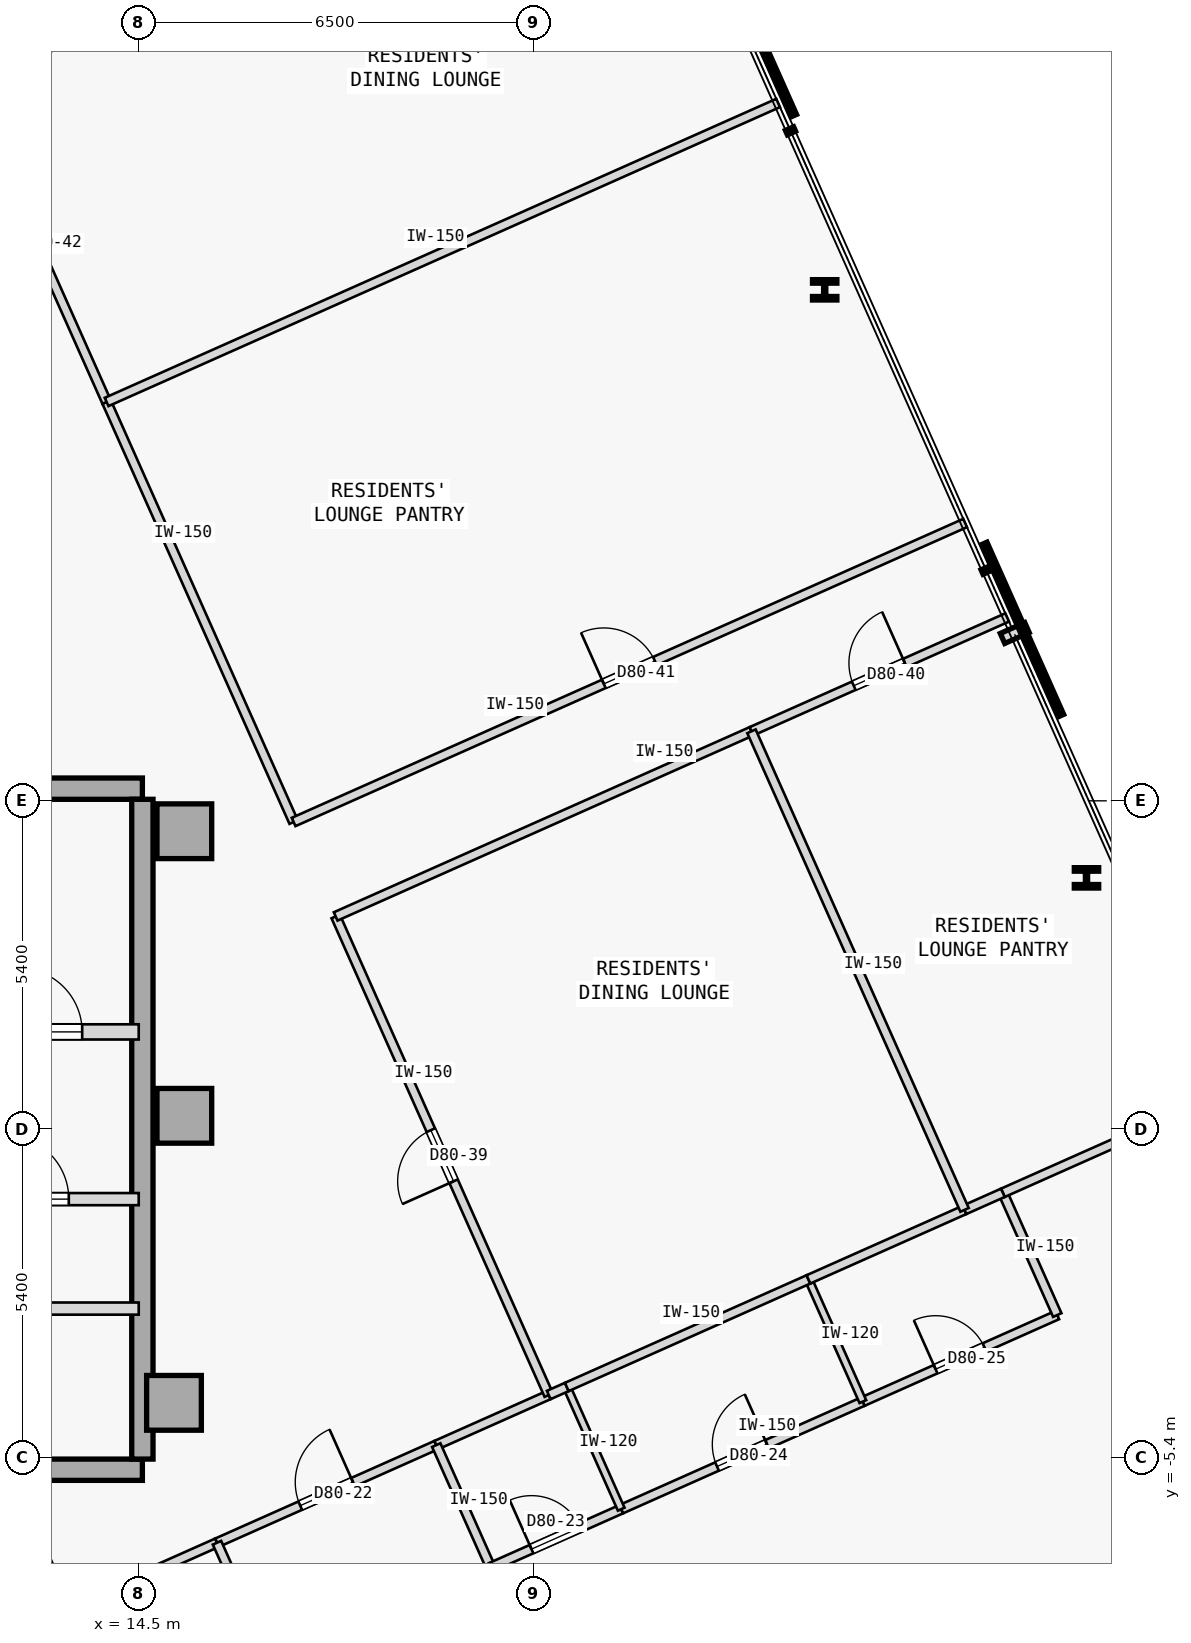
"""IFC4 building model, lengths in metres.
Left out: names, types, materials, properties, quantities, classifications, styles, units other than length and angle.
Written with IfcOpenShell. Run it as: python <this file> out.ifc"""

import sys

from ifc_helpers import new_model, si_unit, direction, frame, frame_2d, origin, origin_2d, place, context, subcontext, project, spatial, rectangle, i_section, extrude, element, fill, save


model = new_model("IFC4")
c1 = context("Model", 3, precision=1e-05, world=origin(), true_north=direction((0.0, 1.0)))
c2 = subcontext(c1, "Body", "Model", "MODEL_VIEW")
j1 = project(units=[si_unit("LENGTHUNIT", "METRE"), si_unit("PLANEANGLEUNIT", "RADIAN")], contexts=[c1])
p1 = place(None, origin())
s1 = spatial("IfcSite", under=j1, at=p1, CompositionType="ELEMENT")
p2 = place(p1, origin())
s2 = spatial("IfcBuilding", under=s1, at=p2, CompositionType="ELEMENT")
p3 = place(p2, frame((0.0, 0.0, 298.65)))
s3 = spatial("IfcBuildingStorey", under=s2, at=p3, CompositionType="ELEMENT", Elevation=298.65)
for number, where, z_axis, x_axis in (
    (1, (15.25, 4.9, 0.0), (0.0, 0.0, 1.0), (1.0, 0.0, 0.0)),
    (2, (15.25, 0.22, 0.0), (0.0, 0.0, 1.0), (1.0, 0.0, 0.0)),
    (3, (15.08, -4.5, 0.0), (0.0, 0.0, 1.0), (1.0, 0.0, 0.0)),
):
    element("IfcColumn", number, at=place(p3, frame(where, z_axis=z_axis, x_axis=x_axis)), inside=s3, PredefinedType="COLUMN", context=c2, shape_type="SweptSolid", body=[
        extrude(rectangle(XDim=0.9, YDim=0.9, at=origin_2d()), origin(), (0.0, 0.0, 1.0), 3.35),
    ])
p4 = place(p3, frame((3.15, 5.6, 0.0), z_axis=(0.0, 0.0, 1.0), x_axis=(1.0, 0.0, 0.0)))
e4 = element("IfcWall", 4, at=p4, inside=s3, PredefinedType="SHEAR", context=c2, shape_type="SweptSolid", body=[
    extrude(rectangle(XDim=11.41, YDim=0.35, at=frame_2d((5.705, 0.0))), origin(), (0.0, 0.0, 1.0), 3.125),
])
p5 = place(p3, frame((3.7, -5.6, 0.0), z_axis=(0.0, 0.0, 1.0), x_axis=(1.0, 0.0, 0.0)))
e5 = element("IfcWall", 5, at=p5, inside=s3, PredefinedType="SHEAR", context=c2, shape_type="SweptSolid", body=[
    extrude(rectangle(XDim=10.86, YDim=0.35, at=frame_2d((5.43, 0.0))), origin(), (0.0, 0.0, 1.0), 3.125),
])
p6 = place(p3, frame((14.56, -5.425, 0.0), z_axis=(0.0, 0.0, 1.0), x_axis=(0.0, 1.0, 0.0)))
e6 = element("IfcWall", 6, at=p6, inside=s3, PredefinedType="SHEAR", context=c2, shape_type="SweptSolid", body=[
    extrude(rectangle(XDim=10.85, YDim=0.35, at=frame_2d((5.425, 0.0))), origin(), (0.0, 0.0, 1.0), 3.125),
])
for number, where, z_axis, x_axis in (
    (7, (30.086, 4.133, 0.0), (0.0, 0.0, 1.0), (1.0, 0.0, 0.0)),
    (8, (25.781, 13.803, 0.0), (0.0, 0.0, 1.0), (1.0, 0.0, 0.0)),
):
    element("IfcColumn", number, at=place(p3, frame(where, z_axis=z_axis, x_axis=x_axis)), inside=s3, PredefinedType="COLUMN", context=c2, shape_type="SweptSolid", body=[
        extrude(i_section(OverallWidth=0.401, OverallDepth=0.335, WebThickness=0.036, FlangeThickness=0.058, FilletRadius=0.015, at=origin_2d()), origin(), (0.0, 0.0, 1.0), 3.35),
    ])
p7 = place(p3, frame((10.9, 1.6, 0.0), z_axis=(0.0, 0.0, 1.0), x_axis=(1.0, 0.0, 0.0)))
e9 = element("IfcWall", 9, at=p7, inside=s3, PredefinedType="STANDARD", context=c2, shape_type="SweptSolid", body=[
    extrude(rectangle(XDim=3.6, YDim=0.25, at=frame_2d((1.8, 0.0))), origin(), (0.0, 0.0, 1.0), 3.125),
])
p8 = place(p7, frame((1.62, 0.0, 0.0)))
e10 = element("IfcOpeningElement", 10, at=p8, cuts=e9, PredefinedType="OPENING", context=c2, shape_type="SweptSolid", body=[
    extrude(rectangle(XDim=1.05, YDim=2.15, at=frame_2d((0.525, 1.075))), frame((0.0, 0.135, 0.0), z_axis=(0.0, -1.0, 0.0), x_axis=(1.0, 0.0, 0.0)), (0.0, 0.0, 1.0), 0.27),
])
p9 = place(p3, frame((11.55, -1.15, 0.0), z_axis=(0.0, 0.0, 1.0), x_axis=(1.0, 0.0, 0.0)))
e11 = element("IfcWall", 11, at=p9, inside=s3, PredefinedType="STANDARD", context=c2, shape_type="SweptSolid", body=[
    extrude(rectangle(XDim=2.95, YDim=0.2, at=frame_2d((1.475, 0.0))), origin(), (0.0, 0.0, 1.0), 3.125),
])
p10 = place(p9, frame((0.75, 0.0, 0.0)))
e12 = element("IfcOpeningElement", 12, at=p10, cuts=e11, PredefinedType="OPENING", context=c2, shape_type="SweptSolid", body=[
    extrude(rectangle(XDim=1.05, YDim=2.18, at=frame_2d((0.525, 1.09))), frame((0.0, 0.11, 0.0), z_axis=(0.0, -1.0, 0.0), x_axis=(1.0, 0.0, 0.0)), (0.0, 0.0, 1.0), 0.22),
])
p11 = place(p3, frame((3.7, -2.95, 0.0), z_axis=(0.0, 0.0, 1.0), x_axis=(1.0, 0.0, 0.0)))
e13 = element("IfcWall", 13, at=p11, inside=s3, PredefinedType="STANDARD", context=c2, shape_type="SweptSolid", body=[
    extrude(rectangle(XDim=10.8, YDim=0.2, at=frame_2d((5.4, 0.0))), origin(), (0.0, 0.0, 1.0), 3.125),
])
p12 = place(p11, frame((0.53, 0.0, 0.0)))
e14 = element("IfcOpeningElement", 14, at=p12, cuts=e13, PredefinedType="OPENING", context=c2, shape_type="SweptSolid", body=[
    extrude(rectangle(XDim=1.1, YDim=2.15, at=frame_2d((0.55, 1.075))), frame((0.0, 0.11, 0.0), z_axis=(0.0, -1.0, 0.0), x_axis=(1.0, 0.0, 0.0)), (0.0, 0.0, 1.0), 0.22),
])
p13 = place(p11, frame((6.02, 0.0, 0.0)))
e15 = element("IfcOpeningElement", 15, at=p13, cuts=e13, PredefinedType="OPENING", context=c2, shape_type="SweptSolid", body=[
    extrude(rectangle(XDim=0.92, YDim=2.15, at=frame_2d((0.46, 1.075))), frame((0.0, 0.11, 0.0), z_axis=(0.0, -1.0, 0.0), x_axis=(1.0, 0.0, 0.0)), (0.0, 0.0, 1.0), 0.22),
])
p14 = place(p3, frame((15.787, -6.8, 0.0), z_axis=(0.0, 0.0, 1.0), x_axis=(0.913558844356, 0.406706574693, 0.0)))
e16 = element("IfcWall", 16, at=p14, inside=s3, PredefinedType="PARTITIONING", context=c2, shape_type="SweptSolid", body=[
    extrude(rectangle(XDim=3.947, YDim=0.15, at=frame_2d((1.973, 0.0))), origin(), (0.0, 0.0, 1.0), 3.125),
])
p15 = place(p14, frame((1.499, 0.0, 0.0)))
e17 = element("IfcOpeningElement", 17, at=p15, cuts=e16, PredefinedType="OPENING", context=c2, shape_type="SweptSolid", body=[
    extrude(rectangle(XDim=0.95, YDim=2.15, at=frame_2d((0.475, 1.075))), frame((0.0, 0.085, 0.0), z_axis=(0.0, -1.0, 0.0), x_axis=(1.0, 0.0, 0.0)), (0.0, 0.0, 1.0), 0.17),
])
p16 = place(p3, frame((19.393, -5.195, 0.0), z_axis=(0.0, 0.0, 1.0), x_axis=(0.91354290336, 0.406742380039, 0.0)))
e18 = element("IfcWall", 18, at=p16, inside=s3, PredefinedType="PARTITIONING", context=c2, shape_type="SweptSolid", body=[
    extrude(rectangle(XDim=2.025, YDim=0.15, at=frame_2d((1.013, 0.0))), origin(), (0.0, 0.0, 1.0), 3.125),
])
p17 = place(p3, frame((10.18, -9.297, 0.0), z_axis=(0.0, 0.0, 1.0), x_axis=(0.913545641557, 0.406736229997, 0.0)))
e19 = element("IfcWall", 19, at=p17, inside=s3, PredefinedType="PARTITIONING", context=c2, shape_type="SweptSolid", body=[
    extrude(rectangle(XDim=6.138, YDim=0.15, at=frame_2d((3.069, 0.0))), origin(), (0.0, 0.0, 1.0), 3.125),
])
p18 = place(p17, frame((2.609, 0.0, 0.0)))
e20 = element("IfcOpeningElement", 20, at=p18, cuts=e19, PredefinedType="OPENING", context=c2, shape_type="SweptSolid", body=[
    extrude(rectangle(XDim=0.92, YDim=2.15, at=frame_2d((0.46, 1.075))), frame((0.0, 0.085, 0.0), z_axis=(0.0, -1.0, 0.0), x_axis=(1.0, 0.0, 0.0)), (0.0, 0.0, 1.0), 0.17),
])
p19 = place(p3, frame((21.243, -4.371, 0.0), z_axis=(0.0, 0.0, 1.0), x_axis=(-0.406751025101, 0.913539054217, 0.0)))
e21 = element("IfcWall", 21, at=p19, inside=s3, PredefinedType="PARTITIONING", context=c2, shape_type="SweptSolid", body=[
    extrude(rectangle(XDim=8.615, YDim=0.15, at=frame_2d((4.308, 0.0))), origin(), (0.0, 0.0, 1.0), 3.125),
])
p20 = place(p19, frame((3.847, 0.0, 0.0)))
e22 = element("IfcOpeningElement", 22, at=p20, cuts=e21, PredefinedType="OPENING", context=c2, shape_type="SweptSolid", body=[
    extrude(rectangle(XDim=0.92, YDim=2.15, at=frame_2d((0.46, 1.075))), frame((0.0, 0.085, 0.0), z_axis=(0.0, -1.0, 0.0), x_axis=(1.0, 0.0, 0.0)), (0.0, 0.0, 1.0), 0.17),
])
p21 = place(p3, frame((17.739, 3.499, 0.0), z_axis=(0.0, 0.0, 1.0), x_axis=(0.913545033673, 0.406737595326, 0.0)))
e23 = element("IfcWall", 23, at=p21, inside=s3, PredefinedType="PARTITIONING", context=c2, shape_type="SweptSolid", body=[
    extrude(rectangle(XDim=7.485, YDim=0.15, at=frame_2d((3.743, 0.0))), origin(), (0.0, 0.0, 1.0), 3.125),
])
p22 = place(p3, frame((24.577, 6.543, 0.0), z_axis=(0.0, 0.0, 1.0), x_axis=(0.913537946403, 0.406753513177, 0.0)))
e24 = element("IfcWall", 24, at=p22, inside=s3, PredefinedType="PARTITIONING", context=c2, shape_type="SweptSolid", body=[
    extrude(rectangle(XDim=4.603, YDim=0.15, at=frame_2d((2.302, 0.0))), origin(), (0.0, 0.0, 1.0), 3.125),
])
p23 = place(p22, frame((1.842, 0.0, 0.0)))
e25 = element("IfcOpeningElement", 25, at=p23, cuts=e24, PredefinedType="OPENING", context=c2, shape_type="SweptSolid", body=[
    extrude(rectangle(XDim=0.92, YDim=2.15, at=frame_2d((0.46, 1.075))), frame((0.0, 0.085, 0.0), z_axis=(0.0, -1.0, 0.0), x_axis=(1.0, 0.0, 0.0)), (0.0, 0.0, 1.0), 0.17),
])
p24 = place(p3, frame((17.047, 5.052, 0.0), z_axis=(0.0, 0.0, 1.0), x_axis=(-0.406752543172, 0.913538378298, 0.0)))
e26 = element("IfcWall", 26, at=p24, inside=s3, PredefinedType="PARTITIONING", context=c2, shape_type="SweptSolid", body=[
    extrude(rectangle(XDim=7.561, YDim=0.15, at=frame_2d((3.781, 0.0))), origin(), (0.0, 0.0, 1.0), 3.125),
])
p25 = place(p3, frame((17.047, 5.052, 0.0), z_axis=(0.0, 0.0, 1.0), x_axis=(0.913549839503, 0.406726801113, 0.0)))
e27 = element("IfcWall", 27, at=p25, inside=s3, PredefinedType="PARTITIONING", context=c2, shape_type="SweptSolid", body=[
    extrude(rectangle(XDim=12.088, YDim=0.15, at=frame_2d((6.044, 0.0))), origin(), (0.0, 0.0, 1.0), 3.125),
])
p26 = place(p25, frame((5.584, 0.0, 0.0)))
e28 = element("IfcOpeningElement", 28, at=p26, cuts=e27, PredefinedType="OPENING", context=c2, shape_type="SweptSolid", body=[
    extrude(rectangle(XDim=0.92, YDim=2.15, at=frame_2d((0.46, 1.075))), frame((0.0, 0.085, 0.0), z_axis=(0.0, -1.0, 0.0), x_axis=(1.0, 0.0, 0.0)), (0.0, 0.0, 1.0), 0.17),
])
p27 = place(p3, frame((13.972, 11.959, 0.0), z_axis=(0.0, 0.0, 1.0), x_axis=(-0.406713331746, 0.913555836159, 0.0)))
e29 = element("IfcWall", 29, at=p27, inside=s3, PredefinedType="PARTITIONING", context=c2, shape_type="SweptSolid", body=[
    extrude(rectangle(XDim=5.713, YDim=0.15, at=frame_2d((2.856, 0.0))), origin(), (0.0, 0.0, 1.0), 3.125),
])
p28 = place(p27, frame((2.396, 0.0, 0.0)))
e30 = element("IfcOpeningElement", 30, at=p28, cuts=e29, PredefinedType="OPENING", context=c2, shape_type="SweptSolid", body=[
    extrude(rectangle(XDim=0.92, YDim=2.15, at=frame_2d((0.46, 1.075))), frame((0.0, 0.085, 0.0), z_axis=(0.0, -1.0, 0.0), x_axis=(1.0, 0.0, 0.0)), (0.0, 0.0, 1.0), 0.17),
])
p29 = place(p3, frame((20.288, -7.205, 0.0), z_axis=(0.0, 0.0, 1.0), x_axis=(-0.406817905151, 0.913509273105, 0.0)))
e31 = element("IfcWall", 31, at=p29, inside=s3, PredefinedType="PARTITIONING", context=c2, shape_type="SweptSolid", body=[
    extrude(rectangle(XDim=2.2, YDim=0.15, at=frame_2d((1.1, 0.0))), origin(), (0.0, 0.0, 1.0), 3.125),
])
p30 = place(p3, frame((20.288, -7.205, 0.0), z_axis=(0.0, 0.0, 1.0), x_axis=(0.913541436194, 0.406745675276, 0.0)))
e32 = element("IfcWall", 32, at=p30, inside=s3, PredefinedType="PARTITIONING", context=c2, shape_type="SweptSolid", body=[
    extrude(rectangle(XDim=2.35, YDim=0.15, at=frame_2d((1.175, 0.0))), origin(), (0.0, 0.0, 1.0), 3.125),
])
p31 = place(p30, frame((0.735, 0.0, 0.0)))
e33 = element("IfcOpeningElement", 33, at=p31, cuts=e32, PredefinedType="OPENING", context=c2, shape_type="SweptSolid", body=[
    extrude(rectangle(XDim=0.88, YDim=2.15, at=frame_2d((0.44, 1.075))), frame((0.0, 0.085, 0.0), z_axis=(0.0, -1.0, 0.0), x_axis=(1.0, 0.0, 0.0)), (0.0, 0.0, 1.0), 0.17),
])
p32 = place(p3, frame((22.435, -6.249, 0.0), z_axis=(0.0, 0.0, 1.0), x_axis=(0.913545193015, 0.406737237438, 0.0)))
e34 = element("IfcWall", 34, at=p32, inside=s3, PredefinedType="PARTITIONING", context=c2, shape_type="SweptSolid", body=[
    extrude(rectangle(XDim=4.35, YDim=0.15, at=frame_2d((2.175, 0.0))), origin(), (0.0, 0.0, 1.0), 3.125),
])
p33 = place(p32, frame((1.725, 0.0, 0.0)))
e35 = element("IfcOpeningElement", 35, at=p33, cuts=e34, PredefinedType="OPENING", context=c2, shape_type="SweptSolid", body=[
    extrude(rectangle(XDim=0.9, YDim=2.15, at=frame_2d((0.45, 1.075))), frame((0.0, 0.085, 0.0), z_axis=(0.0, -1.0, 0.0), x_axis=(1.0, 0.0, 0.0)), (0.0, 0.0, 1.0), 0.17),
])
p34 = place(p3, frame((26.408, -4.48, 0.0), z_axis=(0.0, 0.0, 1.0), x_axis=(0.913549606868, 0.406727323635, 0.0)))
e36 = element("IfcWall", 36, at=p34, inside=s3, PredefinedType="PARTITIONING", context=c2, shape_type="SweptSolid", body=[
    extrude(rectangle(XDim=3.5, YDim=0.15, at=frame_2d((1.75, 0.0))), origin(), (0.0, 0.0, 1.0), 3.125),
])
p35 = place(p34, frame((1.31, 0.0, 0.0)))
e37 = element("IfcOpeningElement", 37, at=p35, cuts=e36, PredefinedType="OPENING", context=c2, shape_type="SweptSolid", body=[
    extrude(rectangle(XDim=0.88, YDim=2.15, at=frame_2d((0.44, 1.075))), frame((0.0, 0.085, 0.0), z_axis=(0.0, -1.0, 0.0), x_axis=(1.0, 0.0, 0.0)), (0.0, 0.0, 1.0), 0.17),
])
p36 = place(p3, frame((29.606, -3.056, 0.0), z_axis=(0.0, 0.0, 1.0), x_axis=(-0.406725294076, 0.913550510459, 0.0)))
e38 = element("IfcWall", 38, at=p36, inside=s3, PredefinedType="PARTITIONING", context=c2, shape_type="SweptSolid", body=[
    extrude(rectangle(XDim=2.2, YDim=0.15, at=frame_2d((1.1, 0.0))), origin(), (0.0, 0.0, 1.0), 3.125),
])
p37 = place(p3, frame((19.665, -15.511, 0.0), z_axis=(0.0, 0.0, 1.0), x_axis=(-0.406729927653, 0.913548447512, 0.0)))
e39 = element("IfcWall", 39, at=p37, inside=s3, PredefinedType="PARTITIONING", context=c2, shape_type="SweptSolid", body=[
    extrude(rectangle(XDim=9.535, YDim=0.15, at=frame_2d((4.768, 0.0))), origin(), (0.0, 0.0, 1.0), 3.125),
])
p38 = place(p3, frame((28.711, -1.046, 0.0), z_axis=(0.0, 0.0, 1.0), x_axis=(0.913523164096, 0.406786711508, 0.0)))
e40 = element("IfcWall", 40, at=p38, inside=s3, PredefinedType="PARTITIONING", context=c2, shape_type="SweptSolid", body=[
    extrude(rectangle(XDim=3.913, YDim=0.15, at=frame_2d((1.957, 0.0))), origin(), (0.0, 0.0, 1.0), 3.125),
])
p39 = place(p3, frame((22.435, -6.249, 0.0), z_axis=(0.0, 0.0, 1.0), x_axis=(-0.406725294076, 0.913550510459, 0.0)))
e41 = element("IfcWall", 41, at=p39, inside=s3, PredefinedType="PARTITIONING", context=c2, shape_type="SweptSolid", body=[
    extrude(rectangle(XDim=2.2, YDim=0.12, at=frame_2d((1.1, 0.0))), origin(), (0.0, 0.0, 1.0), 3.125),
])
p40 = place(p3, frame((21.243, -4.371, 0.0), z_axis=(0.0, 0.0, 1.0), x_axis=(0.913656562077, 0.406487006648, 0.0)))
e42 = element("IfcWall", 42, at=p40, inside=s3, PredefinedType="PARTITIONING", context=c2, shape_type="SweptSolid", body=[
    extrude(rectangle(XDim=0.325, YDim=0.15, at=frame_2d((0.163, 0.0))), origin(), (0.0, 0.0, 1.0), 3.125),
])
p41 = place(p3, frame((26.408, -4.48, 0.0), z_axis=(0.0, 0.0, 1.0), x_axis=(-0.406725294076, 0.913550510459, 0.0)))
e43 = element("IfcWall", 43, at=p41, inside=s3, PredefinedType="PARTITIONING", context=c2, shape_type="SweptSolid", body=[
    extrude(rectangle(XDim=2.2, YDim=0.12, at=frame_2d((1.1, 0.0))), origin(), (0.0, 0.0, 1.0), 3.125),
])
p42 = place(p3, frame((21.54, -4.239, 0.0), z_axis=(0.0, 0.0, 1.0), x_axis=(0.913545193015, 0.406737237438, 0.0)))
e44 = element("IfcWall", 44, at=p42, inside=s3, PredefinedType="PARTITIONING", context=c2, shape_type="SweptSolid", body=[
    extrude(rectangle(XDim=4.35, YDim=0.15, at=frame_2d((2.175, 0.0))), origin(), (0.0, 0.0, 1.0), 3.125),
])
p43 = place(p3, frame((25.514, -2.47, 0.0), z_axis=(0.0, 0.0, 1.0), x_axis=(0.913531886701, 0.406767122542, 0.0)))
e45 = element("IfcWall", 45, at=p43, inside=s3, PredefinedType="PARTITIONING", context=c2, shape_type="SweptSolid", body=[
    extrude(rectangle(XDim=2.81, YDim=0.15, at=frame_2d((1.405, 0.0))), origin(), (0.0, 0.0, 1.0), 3.125),
])
p44 = place(p3, frame((28.081, -1.327, 0.0), z_axis=(0.0, 0.0, 1.0), x_axis=(0.9136217601, 0.406565221671, 0.0)))
e46 = element("IfcWall", 46, at=p44, inside=s3, PredefinedType="PARTITIONING", context=c2, shape_type="SweptSolid", body=[
    extrude(rectangle(XDim=0.69, YDim=0.15, at=frame_2d((0.345, 0.0))), origin(), (0.0, 0.0, 1.0), 3.125),
])
p45 = place(p3, frame((28.081, -1.327, 0.0), z_axis=(0.0, 0.0, 1.0), x_axis=(-0.406751025101, 0.913539054217, 0.0)))
e47 = element("IfcWall", 47, at=p45, inside=s3, PredefinedType="PARTITIONING", context=c2, shape_type="SweptSolid", body=[
    extrude(rectangle(XDim=8.615, YDim=0.15, at=frame_2d((4.308, 0.0))), origin(), (0.0, 0.0, 1.0), 3.125),
])
p46 = place(p3, frame((13.972, 11.959, 0.0), z_axis=(0.0, 0.0, 1.0), x_axis=(0.913549839503, 0.406726801113, 0.0)))
e48 = element("IfcWall", 48, at=p46, inside=s3, PredefinedType="PARTITIONING", context=c2, shape_type="SweptSolid", body=[
    extrude(rectangle(XDim=12.088, YDim=0.15, at=frame_2d((6.044, 0.0))), origin(), (0.0, 0.0, 1.0), 3.125),
])
p47 = place(p3, frame((11.648, 17.178, 0.0), z_axis=(0.0, 0.0, 1.0), x_axis=(0.913542334914, 0.406743656766, 0.0)))
e49 = element("IfcWall", 49, at=p47, inside=s3, PredefinedType="PARTITIONING", context=c2, shape_type="SweptSolid", body=[
    extrude(rectangle(XDim=12.088, YDim=0.15, at=frame_2d((6.044, 0.0))), origin(), (0.0, 0.0, 1.0), 3.125),
])
p48 = place(p8, origin())
e50 = element("IfcDoor", 50, at=p48, inside=s3, OperationType="SINGLE_SWING_LEFT", PredefinedType="DOOR", context=c2, shape_type="SweptSolid", body=[
    extrude(rectangle(XDim=1.05, YDim=2.15, at=frame_2d((0.525, 1.075))), frame((0.0, 0.025, 0.0), z_axis=(0.0, -1.0, 0.0), x_axis=(1.0, 0.0, 0.0)), (0.0, 0.0, 1.0), 0.05),
])
fill(e10, e50)
p49 = place(p10, origin())
e51 = element("IfcDoor", 51, at=p49, inside=s3, OperationType="SINGLE_SWING_LEFT", PredefinedType="DOOR", context=c2, shape_type="SweptSolid", body=[
    extrude(rectangle(XDim=1.05, YDim=2.18, at=frame_2d((0.525, 1.09))), frame((0.0, 0.025, 0.0), z_axis=(0.0, -1.0, 0.0), x_axis=(1.0, 0.0, 0.0)), (0.0, 0.0, 1.0), 0.05),
])
fill(e12, e51)
p50 = place(p15, origin())
e52 = element("IfcDoor", 52, at=p50, inside=s3, OperationType="SINGLE_SWING_RIGHT", PredefinedType="DOOR", context=c2, shape_type="SweptSolid", body=[
    extrude(rectangle(XDim=0.95, YDim=2.15, at=frame_2d((0.475, 1.075))), frame((0.0, 0.025, 0.0), z_axis=(0.0, -1.0, 0.0), x_axis=(1.0, 0.0, 0.0)), (0.0, 0.0, 1.0), 0.05),
])
fill(e17, e52)
p51 = place(p31, origin())
e53 = element("IfcDoor", 53, at=p51, inside=s3, OperationType="SINGLE_SWING_LEFT", PredefinedType="DOOR", context=c2, shape_type="SweptSolid", body=[
    extrude(rectangle(XDim=0.88, YDim=2.15, at=frame_2d((0.44, 1.075))), frame((0.0, 0.025, 0.0), z_axis=(0.0, -1.0, 0.0), x_axis=(1.0, 0.0, 0.0)), (0.0, 0.0, 1.0), 0.05),
])
fill(e33, e53)
p52 = place(p33, origin())
e54 = element("IfcDoor", 54, at=p52, inside=s3, OperationType="SINGLE_SWING_RIGHT", PredefinedType="DOOR", context=c2, shape_type="SweptSolid", body=[
    extrude(rectangle(XDim=0.9, YDim=2.15, at=frame_2d((0.45, 1.075))), frame((0.0, 0.025, 0.0), z_axis=(0.0, -1.0, 0.0), x_axis=(1.0, 0.0, 0.0)), (0.0, 0.0, 1.0), 0.05),
])
fill(e35, e54)
p53 = place(p35, origin())
e55 = element("IfcDoor", 55, at=p53, inside=s3, OperationType="SINGLE_SWING_LEFT", PredefinedType="DOOR", context=c2, shape_type="SweptSolid", body=[
    extrude(rectangle(XDim=0.88, YDim=2.15, at=frame_2d((0.44, 1.075))), frame((0.0, 0.025, 0.0), z_axis=(0.0, -1.0, 0.0), x_axis=(1.0, 0.0, 0.0)), (0.0, 0.0, 1.0), 0.05),
])
fill(e37, e55)
p54 = place(p20, origin())
e56 = element("IfcDoor", 56, at=p54, inside=s3, OperationType="SINGLE_SWING_LEFT", PredefinedType="DOOR", context=c2, shape_type="SweptSolid", body=[
    extrude(rectangle(XDim=0.92, YDim=2.15, at=frame_2d((0.46, 1.075))), frame((0.0, 0.025, 0.0), z_axis=(0.0, -1.0, 0.0), x_axis=(1.0, 0.0, 0.0)), (0.0, 0.0, 1.0), 0.05),
])
fill(e22, e56)
p55 = place(p23, origin())
e57 = element("IfcDoor", 57, at=p55, inside=s3, OperationType="SINGLE_SWING_RIGHT", PredefinedType="DOOR", context=c2, shape_type="SweptSolid", body=[
    extrude(rectangle(XDim=0.92, YDim=2.15, at=frame_2d((0.46, 1.075))), frame((0.0, 0.025, 0.0), z_axis=(0.0, -1.0, 0.0), x_axis=(1.0, 0.0, 0.0)), (0.0, 0.0, 1.0), 0.05),
])
fill(e25, e57)
p56 = place(p26, origin())
e58 = element("IfcDoor", 58, at=p56, inside=s3, OperationType="SINGLE_SWING_LEFT", PredefinedType="DOOR", context=c2, shape_type="SweptSolid", body=[
    extrude(rectangle(XDim=0.92, YDim=2.15, at=frame_2d((0.46, 1.075))), frame((0.0, 0.025, 0.0), z_axis=(0.0, -1.0, 0.0), x_axis=(1.0, 0.0, 0.0)), (0.0, 0.0, 1.0), 0.05),
])
fill(e28, e58)
save(model, sys.argv[1])
